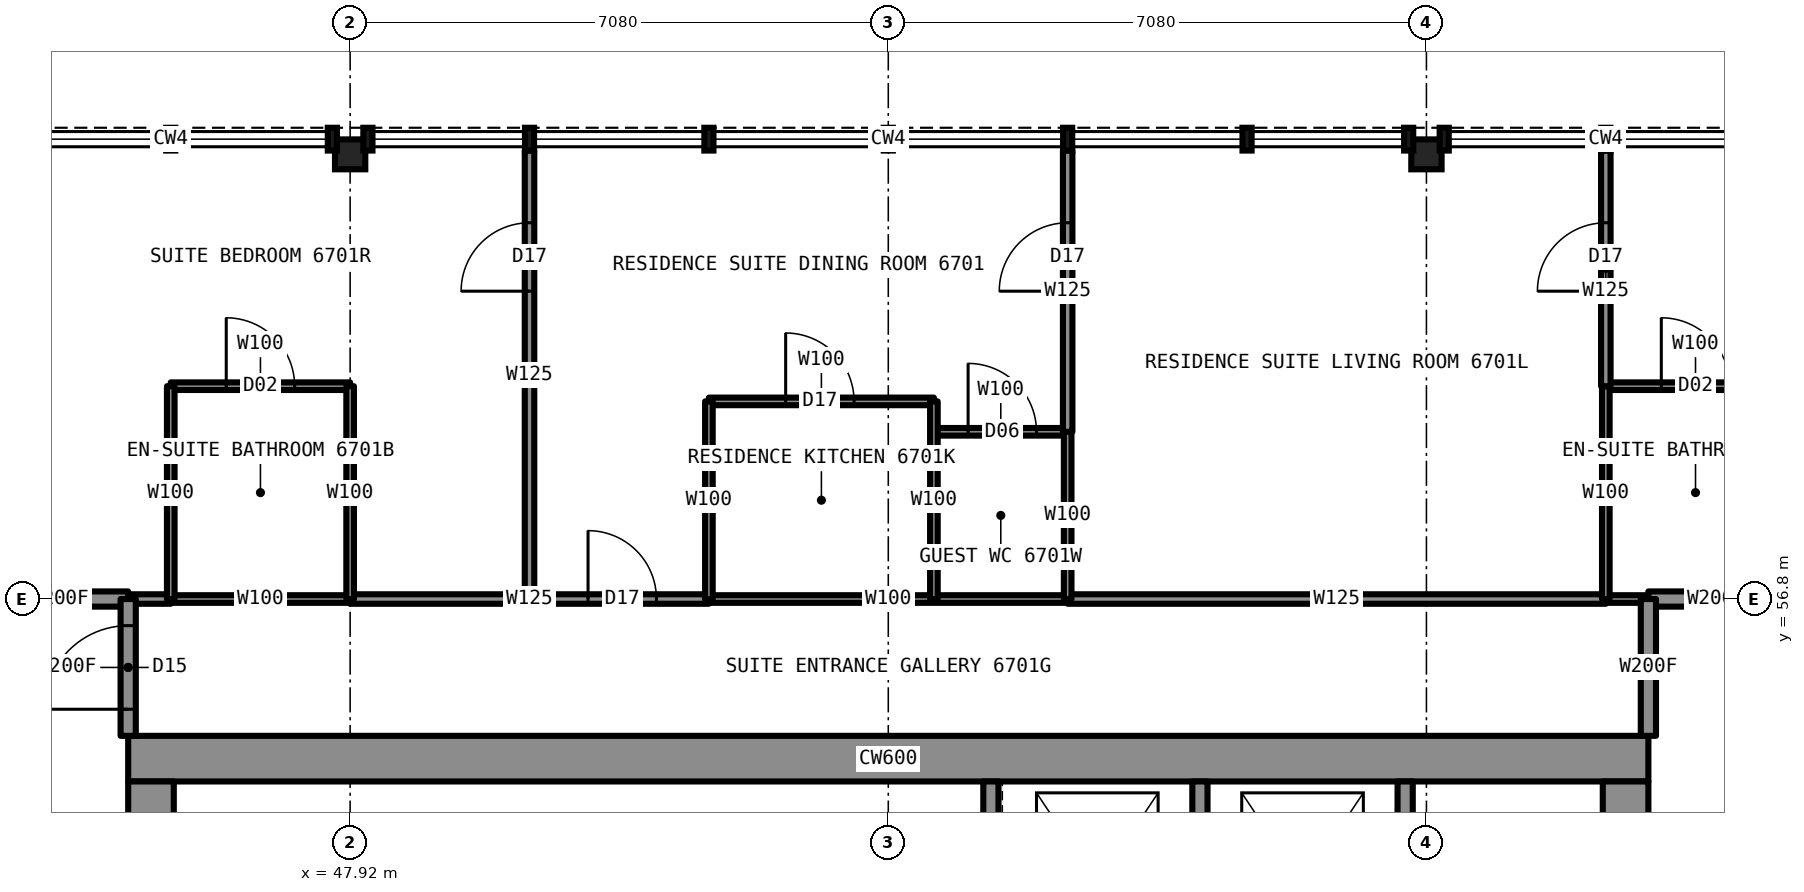
"""IFC4 building model, lengths in metres.
Left out: names, types, materials, properties, quantities, classifications, styles, units other than length and angle.
Written with IfcOpenShell. Run it as: python <this file> out.ifc"""

import sys

from ifc_helpers import new_model, si_unit, direction, frame, frame_2d, origin, origin_2d, place, context, subcontext, project, spatial, rectangle, i_section, extrude, element, fill, save


model = new_model("IFC4")
c1 = context("Model", 3, precision=1e-05, world=origin(), true_north=direction((0.0, 1.0)))
c2 = subcontext(c1, "Body", "Model", "MODEL_VIEW")
j1 = project(units=[si_unit("LENGTHUNIT", "METRE"), si_unit("PLANEANGLEUNIT", "RADIAN")], contexts=[c1])
p1 = place(None, origin())
s1 = spatial("IfcSite", under=j1, at=p1, CompositionType="ELEMENT")
p2 = place(p1, origin())
s2 = spatial("IfcBuilding", under=s1, at=p2, CompositionType="ELEMENT")
p3 = place(p2, frame((0.0, 0.0, 247.7)))
s3 = spatial("IfcBuildingStorey", under=s2, at=p3, CompositionType="ELEMENT", Elevation=247.7)
for number, where, z_axis, x_axis in (
    (1, (47.92, 62.65, 0.0), (0.0, 0.0, 1.0), (1.0, 0.0, 0.0)),
    (2, (62.08, 62.65, 0.0), (0.0, 0.0, 1.0), (1.0, 0.0, 0.0)),
):
    element("IfcColumn", number, at=place(p3, frame(where, z_axis=z_axis, x_axis=x_axis)), inside=s3, PredefinedType="COLUMN", context=c2, shape_type="SweptSolid", body=[
        extrude(i_section(OverallWidth=0.399, OverallDepth=0.394, WebThickness=0.023, FlangeThickness=0.037, at=origin_2d()), origin(), (0.0, 0.0, 1.0), 3.5),
    ])
p4 = place(p3, frame((45.0, 54.7, 0.0), z_axis=(0.0, 0.0, 1.0), x_axis=(1.0, 0.0, 0.0)))
e3 = element("IfcWall", 3, at=p4, inside=s3, PredefinedType="SHEAR", context=c2, shape_type="SweptSolid", body=[
    extrude(rectangle(XDim=20.0, YDim=0.6, at=frame_2d((10.0, 0.0))), origin(), (0.0, 0.0, 1.0), 3.5),
])
p5 = place(p3, frame((64.7, 35.6, 0.0), z_axis=(0.0, 0.0, 1.0), x_axis=(0.0, 1.0, 0.0)))
e4 = element("IfcWall", 4, at=p5, inside=s3, PredefinedType="SHEAR", context=c2, shape_type="SweptSolid", body=[
    extrude(rectangle(XDim=18.8, YDim=0.6, at=frame_2d((9.4, 0.0))), origin(), (0.0, 0.0, 1.0), 3.5),
])
p6 = place(p5, frame((13.4, 0.0, 0.0)))
e5 = element("IfcOpeningElement", 5, at=p6, cuts=e4, PredefinedType="OPENING", context=c2, shape_type="SweptSolid", body=[
    extrude(rectangle(XDim=1.8, YDim=2.2, at=frame_2d((0.9, 1.1))), frame((0.0, 0.31, 0.0), z_axis=(0.0, -1.0, 0.0), x_axis=(1.0, 0.0, 0.0)), (0.0, 0.0, 1.0), 0.62),
])
p7 = place(p5, frame((3.6, 0.0, 0.0)))
e6 = element("IfcOpeningElement", 6, at=p7, cuts=e4, PredefinedType="OPENING", context=c2, shape_type="SweptSolid", body=[
    extrude(rectangle(XDim=1.8, YDim=2.2, at=frame_2d((0.9, 1.1))), frame((0.0, 0.31, 0.0), z_axis=(0.0, -1.0, 0.0), x_axis=(1.0, 0.0, 0.0)), (0.0, 0.0, 1.0), 0.62),
])
p8 = place(p3, frame((45.3, 35.6, 0.0), z_axis=(0.0, 0.0, 1.0), x_axis=(0.0, 1.0, 0.0)))
e7 = element("IfcWall", 7, at=p8, inside=s3, PredefinedType="SHEAR", context=c2, shape_type="SweptSolid", body=[
    extrude(rectangle(XDim=18.8, YDim=0.6, at=frame_2d((9.4, 0.0))), origin(), (0.0, 0.0, 1.0), 3.5),
])
p9 = place(p8, frame((13.4, 0.0, 0.0)))
e8 = element("IfcOpeningElement", 8, at=p9, cuts=e7, PredefinedType="OPENING", context=c2, shape_type="SweptSolid", body=[
    extrude(rectangle(XDim=1.8, YDim=2.2, at=frame_2d((0.9, 1.1))), frame((0.0, 0.31, 0.0), z_axis=(0.0, -1.0, 0.0), x_axis=(1.0, 0.0, 0.0)), (0.0, 0.0, 1.0), 0.62),
])
p10 = place(p8, frame((3.6, 0.0, 0.0)))
e9 = element("IfcOpeningElement", 9, at=p10, cuts=e7, PredefinedType="OPENING", context=c2, shape_type="SweptSolid", body=[
    extrude(rectangle(XDim=1.8, YDim=2.2, at=frame_2d((0.9, 1.1))), frame((0.0, 0.31, 0.0), z_axis=(0.0, -1.0, 0.0), x_axis=(1.0, 0.0, 0.0)), (0.0, 0.0, 1.0), 0.62),
])
p11 = place(p8, frame((6.4, 0.0, 0.0)))
e10 = element("IfcOpeningElement", 10, at=p11, cuts=e7, PredefinedType="OPENING", context=c2, shape_type="SweptSolid", body=[
    extrude(rectangle(XDim=1.2, YDim=2.2, at=frame_2d((0.6, 1.1))), frame((0.0, 0.31, 0.0), z_axis=(0.0, -1.0, 0.0), x_axis=(1.0, 0.0, 0.0)), (0.0, 0.0, 1.0), 0.62),
])
p12 = place(p3, frame((45.56, 56.8, 0.0), z_axis=(0.0, 0.0, 1.0), x_axis=(1.0, 0.0, 0.0)))
e11 = element("IfcWall", 11, at=p12, inside=s3, PredefinedType="PARTITIONING", context=c2, shape_type="SweptSolid", body=[
    extrude(rectangle(XDim=2.36, YDim=0.1, at=frame_2d((1.18, 0.0))), origin(), (0.0, 0.0, 1.0), 3.33),
])
p13 = place(p3, frame((52.64, 56.8, 0.0), z_axis=(0.0, 0.0, 1.0), x_axis=(1.0, 0.0, 0.0)))
e12 = element("IfcWall", 12, at=p13, inside=s3, PredefinedType="PARTITIONING", context=c2, shape_type="SweptSolid", body=[
    extrude(rectangle(XDim=4.72, YDim=0.1, at=frame_2d((2.36, 0.0))), origin(), (0.0, 0.0, 1.0), 3.33),
])
p14 = place(p3, frame((64.44, 56.8, 0.0), z_axis=(0.0, 0.0, 1.0), x_axis=(1.0, 0.0, 0.0)))
e13 = element("IfcWall", 13, at=p14, inside=s3, PredefinedType="PARTITIONING", context=c2, shape_type="SweptSolid", body=[
    extrude(rectangle(XDim=0.56, YDim=0.1, at=frame_2d((0.28, 0.0))), origin(), (0.0, 0.0, 1.0), 3.33),
])
p15 = place(p3, frame((43.2, 56.8, 0.0), z_axis=(0.0, 0.0, 1.0), x_axis=(1.0, 0.0, 0.0)))
e14 = element("IfcWall", 14, at=p15, inside=s3, PredefinedType="PARTITIONING", context=c2, shape_type="SweptSolid", body=[
    extrude(rectangle(XDim=1.8, YDim=0.2, at=frame_2d((0.9, 0.0))), origin(), (0.0, 0.0, 1.0), 3.33),
])
p16 = place(p3, frame((65.0, 56.8, 0.0), z_axis=(0.0, 0.0, 1.0), x_axis=(1.0, 0.0, 0.0)))
e15 = element("IfcWall", 15, at=p16, inside=s3, PredefinedType="PARTITIONING", context=c2, shape_type="SweptSolid", body=[
    extrude(rectangle(XDim=1.78, YDim=0.2, at=frame_2d((0.89, 0.0))), origin(), (0.0, 0.0, 1.0), 3.33),
])
p17 = place(p3, frame((45.0, 56.8, 0.0), z_axis=(0.0, 0.0, 1.0), x_axis=(1.0, 0.0, 0.0)))
e16 = element("IfcWall", 16, at=p17, inside=s3, PredefinedType="PARTITIONING", context=c2, shape_type="SweptSolid", body=[
    extrude(rectangle(XDim=0.56, YDim=0.125, at=frame_2d((0.28, 0.0))), origin(), (0.0, 0.0, 1.0), 3.33),
])
p18 = place(p3, frame((47.92, 56.8, 0.0), z_axis=(0.0, 0.0, 1.0), x_axis=(1.0, 0.0, 0.0)))
e17 = element("IfcWall", 17, at=p18, inside=s3, PredefinedType="PARTITIONING", context=c2, shape_type="SweptSolid", body=[
    extrude(rectangle(XDim=4.72, YDim=0.125, at=frame_2d((2.36, 0.0))), origin(), (0.0, 0.0, 1.0), 3.33),
])
p19 = place(p18, frame((3.13, 0.0, 0.0)))
e18 = element("IfcOpeningElement", 18, at=p19, cuts=e17, PredefinedType="OPENING", context=c2, shape_type="SweptSolid", body=[
    extrude(rectangle(XDim=0.9, YDim=2.2, at=frame_2d((0.45, 1.1))), frame((0.0, 0.073, 0.0), z_axis=(0.0, -1.0, 0.0), x_axis=(1.0, 0.0, 0.0)), (0.0, 0.0, 1.0), 0.145),
])
p20 = place(p3, frame((57.36, 56.8, 0.0), z_axis=(0.0, 0.0, 1.0), x_axis=(1.0, 0.0, 0.0)))
e19 = element("IfcWall", 19, at=p20, inside=s3, PredefinedType="PARTITIONING", context=c2, shape_type="SweptSolid", body=[
    extrude(rectangle(XDim=7.08, YDim=0.125, at=frame_2d((3.54, 0.0))), origin(), (0.0, 0.0, 1.0), 3.33),
])
p21 = place(p3, frame((55.6, 59.0, 0.0), z_axis=(0.0, 0.0, 1.0), x_axis=(1.0, 0.0, 0.0)))
e20 = element("IfcWall", 20, at=p21, inside=s3, PredefinedType="PARTITIONING", context=c2, shape_type="SweptSolid", body=[
    extrude(rectangle(XDim=1.76, YDim=0.1, at=frame_2d((0.88, 0.0))), origin(), (0.0, 0.0, 1.0), 3.33),
])
p22 = place(p21, frame((0.45, 0.0, 0.0)))
e21 = element("IfcOpeningElement", 21, at=p22, cuts=e20, PredefinedType="OPENING", context=c2, shape_type="SweptSolid", body=[
    extrude(rectangle(XDim=0.9, YDim=2.1, at=frame_2d((0.45, 1.05))), frame((0.0, 0.06, 0.0), z_axis=(0.0, -1.0, 0.0), x_axis=(1.0, 0.0, 0.0)), (0.0, 0.0, 1.0), 0.12),
])
p23 = place(p3, frame((52.64, 59.4, 0.0), z_axis=(0.0, 0.0, 1.0), x_axis=(1.0, 0.0, 0.0)))
e22 = element("IfcWall", 22, at=p23, inside=s3, PredefinedType="PARTITIONING", context=c2, shape_type="SweptSolid", body=[
    extrude(rectangle(XDim=2.96, YDim=0.1, at=frame_2d((1.48, 0.0))), origin(), (0.0, 0.0, 1.0), 3.33),
])
p24 = place(p23, frame((1.01, 0.0, 0.0)))
e23 = element("IfcOpeningElement", 23, at=p24, cuts=e22, PredefinedType="OPENING", context=c2, shape_type="SweptSolid", body=[
    extrude(rectangle(XDim=0.9, YDim=2.2, at=frame_2d((0.45, 1.1))), frame((0.0, 0.06, 0.0), z_axis=(0.0, -1.0, 0.0), x_axis=(1.0, 0.0, 0.0)), (0.0, 0.0, 1.0), 0.12),
])
p25 = place(p3, frame((45.56, 59.6, 0.0), z_axis=(0.0, 0.0, 1.0), x_axis=(1.0, 0.0, 0.0)))
e24 = element("IfcWall", 24, at=p25, inside=s3, PredefinedType="PARTITIONING", context=c2, shape_type="SweptSolid", body=[
    extrude(rectangle(XDim=2.36, YDim=0.1, at=frame_2d((1.18, 0.0))), origin(), (0.0, 0.0, 1.0), 3.33),
])
p26 = place(p25, frame((0.73, 0.0, 0.0)))
e25 = element("IfcOpeningElement", 25, at=p26, cuts=e24, PredefinedType="OPENING", context=c2, shape_type="SweptSolid", body=[
    extrude(rectangle(XDim=0.9, YDim=2.1, at=frame_2d((0.45, 1.05))), frame((0.0, 0.06, 0.0), z_axis=(0.0, -1.0, 0.0), x_axis=(1.0, 0.0, 0.0)), (0.0, 0.0, 1.0), 0.12),
])
p27 = place(p3, frame((64.44, 59.6, 0.0), z_axis=(0.0, 0.0, 1.0), x_axis=(1.0, 0.0, 0.0)))
e26 = element("IfcWall", 26, at=p27, inside=s3, PredefinedType="PARTITIONING", context=c2, shape_type="SweptSolid", body=[
    extrude(rectangle(XDim=2.36, YDim=0.1, at=frame_2d((1.18, 0.0))), origin(), (0.0, 0.0, 1.0), 3.33),
])
p28 = place(p27, frame((0.73, 0.0, 0.0)))
e27 = element("IfcOpeningElement", 27, at=p28, cuts=e26, PredefinedType="OPENING", context=c2, shape_type="SweptSolid", body=[
    extrude(rectangle(XDim=0.9, YDim=2.1, at=frame_2d((0.45, 1.05))), frame((0.0, 0.06, 0.0), z_axis=(0.0, -1.0, 0.0), x_axis=(1.0, 0.0, 0.0)), (0.0, 0.0, 1.0), 0.12),
])
p29 = place(p3, frame((45.0, 55.0, 0.0), z_axis=(0.0, 0.0, 1.0), x_axis=(0.0, 1.0, 0.0)))
e28 = element("IfcWall", 28, at=p29, inside=s3, PredefinedType="PARTITIONING", context=c2, shape_type="SweptSolid", body=[
    extrude(rectangle(XDim=1.8, YDim=0.2, at=frame_2d((0.9, 0.0))), origin(), (0.0, 0.0, 1.0), 3.33),
])
p30 = place(p29, frame((0.35, 0.0, 0.0)))
e29 = element("IfcOpeningElement", 29, at=p30, cuts=e28, PredefinedType="OPENING", context=c2, shape_type="SweptSolid", body=[
    extrude(rectangle(XDim=1.1, YDim=2.2, at=frame_2d((0.55, 1.1))), frame((0.0, 0.11, 0.0), z_axis=(0.0, -1.0, 0.0), x_axis=(1.0, 0.0, 0.0)), (0.0, 0.0, 1.0), 0.22),
])
p31 = place(p3, frame((52.64, 56.8, 0.0), z_axis=(0.0, 0.0, 1.0), x_axis=(0.0, 1.0, 0.0)))
e30 = element("IfcWall", 30, at=p31, inside=s3, PredefinedType="PARTITIONING", context=c2, shape_type="SweptSolid", body=[
    extrude(rectangle(XDim=2.6, YDim=0.1, at=frame_2d((1.3, 0.0))), origin(), (0.0, 0.0, 1.0), 3.33),
])
p32 = place(p3, frame((50.28, 56.8, 0.0), z_axis=(0.0, 0.0, 1.0), x_axis=(0.0, 1.0, 0.0)))
e31 = element("IfcWall", 31, at=p32, inside=s3, PredefinedType="PARTITIONING", context=c2, shape_type="SweptSolid", body=[
    extrude(rectangle(XDim=5.9, YDim=0.125, at=frame_2d((2.95, 0.0))), origin(), (0.0, 0.0, 1.0), 3.33),
])
p33 = place(p32, frame((4.05, 0.0, 0.0)))
e32 = element("IfcOpeningElement", 32, at=p33, cuts=e31, PredefinedType="OPENING", context=c2, shape_type="SweptSolid", body=[
    extrude(rectangle(XDim=0.9, YDim=2.2, at=frame_2d((0.45, 1.1))), frame((0.0, 0.073, 0.0), z_axis=(0.0, -1.0, 0.0), x_axis=(1.0, 0.0, 0.0)), (0.0, 0.0, 1.0), 0.145),
])
p34 = place(p3, frame((47.92, 56.8, 0.0), z_axis=(0.0, 0.0, 1.0), x_axis=(0.0, 1.0, 0.0)))
e33 = element("IfcWall", 33, at=p34, inside=s3, PredefinedType="PARTITIONING", context=c2, shape_type="SweptSolid", body=[
    extrude(rectangle(XDim=2.8, YDim=0.1, at=frame_2d((1.4, 0.0))), origin(), (0.0, 0.0, 1.0), 2.573),
])
p35 = place(p3, frame((45.56, 56.8, 0.0), z_axis=(0.0, 0.0, 1.0), x_axis=(0.0, 1.0, 0.0)))
e34 = element("IfcWall", 34, at=p35, inside=s3, PredefinedType="PARTITIONING", context=c2, shape_type="SweptSolid", body=[
    extrude(rectangle(XDim=2.8, YDim=0.1, at=frame_2d((1.4, 0.0))), origin(), (0.0, 0.0, 1.0), 3.33),
])
p36 = place(p3, frame((55.6, 56.8, 0.0), z_axis=(0.0, 0.0, 1.0), x_axis=(0.0, 1.0, 0.0)))
e35 = element("IfcWall", 35, at=p36, inside=s3, PredefinedType="PARTITIONING", context=c2, shape_type="SweptSolid", body=[
    extrude(rectangle(XDim=2.6, YDim=0.1, at=frame_2d((1.3, 0.0))), origin(), (0.0, 0.0, 1.0), 3.33),
])
p37 = place(p3, frame((65.0, 55.0, 0.0), z_axis=(0.0, 0.0, 1.0), x_axis=(0.0, 1.0, 0.0)))
e36 = element("IfcWall", 36, at=p37, inside=s3, PredefinedType="PARTITIONING", context=c2, shape_type="SweptSolid", body=[
    extrude(rectangle(XDim=1.8, YDim=0.2, at=frame_2d((0.9, 0.0))), origin(), (0.0, 0.0, 1.0), 3.33),
])
p38 = place(p3, frame((57.36, 56.8, 0.0), z_axis=(0.0, 0.0, 1.0), x_axis=(0.0, 1.0, 0.0)))
e37 = element("IfcWall", 37, at=p38, inside=s3, PredefinedType="PARTITIONING", context=c2, shape_type="SweptSolid", body=[
    extrude(rectangle(XDim=2.2, YDim=0.1, at=frame_2d((1.1, 0.0))), origin(), (0.0, 0.0, 1.0), 3.33),
])
p39 = place(p3, frame((57.36, 59.0, 0.0), z_axis=(0.0, 0.0, 1.0), x_axis=(0.0, 1.0, 0.0)))
e38 = element("IfcWall", 38, at=p39, inside=s3, PredefinedType="PARTITIONING", context=c2, shape_type="SweptSolid", body=[
    extrude(rectangle(XDim=3.7, YDim=0.125, at=frame_2d((1.85, 0.0))), origin(), (0.0, 0.0, 1.0), 3.33),
])
p40 = place(p39, frame((1.85, 0.0, 0.0)))
e39 = element("IfcOpeningElement", 39, at=p40, cuts=e38, PredefinedType="OPENING", context=c2, shape_type="SweptSolid", body=[
    extrude(rectangle(XDim=0.9, YDim=2.2, at=frame_2d((0.45, 1.1))), frame((0.0, 0.073, 0.0), z_axis=(0.0, -1.0, 0.0), x_axis=(1.0, 0.0, 0.0)), (0.0, 0.0, 1.0), 0.145),
])
p41 = place(p3, frame((64.44, 56.8, 0.0), z_axis=(0.0, 0.0, 1.0), x_axis=(0.0, 1.0, 0.0)))
e40 = element("IfcWall", 40, at=p41, inside=s3, PredefinedType="PARTITIONING", context=c2, shape_type="SweptSolid", body=[
    extrude(rectangle(XDim=2.8, YDim=0.1, at=frame_2d((1.4, 0.0))), origin(), (0.0, 0.0, 1.0), 3.33),
])
p42 = place(p3, frame((64.44, 59.6, 0.0), z_axis=(0.0, 0.0, 1.0), x_axis=(0.0, 1.0, 0.0)))
e41 = element("IfcWall", 41, at=p42, inside=s3, PredefinedType="PARTITIONING", context=c2, shape_type="SweptSolid", body=[
    extrude(rectangle(XDim=3.1, YDim=0.125, at=frame_2d((1.55, 0.0))), origin(), (0.0, 0.0, 1.0), 3.33),
])
p43 = place(p42, frame((1.25, 0.0, 0.0)))
e42 = element("IfcOpeningElement", 42, at=p43, cuts=e41, PredefinedType="OPENING", context=c2, shape_type="SweptSolid", body=[
    extrude(rectangle(XDim=0.9, YDim=2.2, at=frame_2d((0.45, 1.1))), frame((0.0, 0.073, 0.0), z_axis=(0.0, -1.0, 0.0), x_axis=(1.0, 0.0, 0.0)), (0.0, 0.0, 1.0), 0.145),
])
for number, where, z_axis, x_axis in (
    (43, (59.1, 51.7, 0.0), (0.0, 0.0, 1.0), (0.0, 1.0, 0.0)),
    (44, (61.8, 51.7, 0.0), (0.0, 0.0, 1.0), (0.0, 1.0, 0.0)),
    (45, (56.35, 51.7, 0.0), (0.0, 0.0, 1.0), (0.0, 1.0, 0.0)),
):
    element("IfcWall", number, at=place(p3, frame(where, z_axis=z_axis, x_axis=x_axis)), inside=s3, PredefinedType="PARTITIONING", context=c2, shape_type="SweptSolid", body=[
        extrude(rectangle(XDim=2.7, YDim=0.2, at=frame_2d((1.35, 0.0))), origin(), (0.0, 0.0, 1.0), 3.33),
    ])
p44 = place(p19, origin())
e46 = element("IfcDoor", 46, at=p44, inside=s3, OperationType="SINGLE_SWING_LEFT", PredefinedType="DOOR", context=c2, shape_type="SweptSolid", body=[
    extrude(rectangle(XDim=0.9, YDim=2.2, at=frame_2d((0.45, 1.1))), frame((0.0, 0.025, 0.0), z_axis=(0.0, -1.0, 0.0), x_axis=(1.0, 0.0, 0.0)), (0.0, 0.0, 1.0), 0.05),
])
fill(e18, e46)
p45 = place(p26, origin())
e47 = element("IfcDoor", 47, at=p45, inside=s3, OperationType="SINGLE_SWING_RIGHT", PredefinedType="DOOR", context=c2, shape_type="SweptSolid", body=[
    extrude(rectangle(XDim=0.9, YDim=2.1, at=frame_2d((0.45, 1.05))), frame((0.0, 0.025, 0.0), z_axis=(0.0, -1.0, 0.0), x_axis=(1.0, 0.0, 0.0)), (0.0, 0.0, 1.0), 0.05),
])
fill(e25, e47)
p46 = place(p28, origin())
e48 = element("IfcDoor", 48, at=p46, inside=s3, OperationType="SINGLE_SWING_RIGHT", PredefinedType="DOOR", context=c2, shape_type="SweptSolid", body=[
    extrude(rectangle(XDim=0.9, YDim=2.1, at=frame_2d((0.45, 1.05))), frame((0.0, 0.025, 0.0), z_axis=(0.0, -1.0, 0.0), x_axis=(1.0, 0.0, 0.0)), (0.0, 0.0, 1.0), 0.05),
])
fill(e27, e48)
p47 = place(p30, origin())
e49 = element("IfcDoor", 49, at=p47, inside=s3, OperationType="SINGLE_SWING_LEFT", PredefinedType="DOOR", context=c2, shape_type="SweptSolid", body=[
    extrude(rectangle(XDim=1.1, YDim=2.2, at=frame_2d((0.55, 1.1))), frame((0.0, 0.025, 0.0), z_axis=(0.0, -1.0, 0.0), x_axis=(1.0, 0.0, 0.0)), (0.0, 0.0, 1.0), 0.05),
])
fill(e29, e49)
p48 = place(p24, origin())
e50 = element("IfcDoor", 50, at=p48, inside=s3, OperationType="SINGLE_SWING_LEFT", PredefinedType="DOOR", context=c2, shape_type="SweptSolid", body=[
    extrude(rectangle(XDim=0.9, YDim=2.2, at=frame_2d((0.45, 1.1))), frame((0.0, 0.025, 0.0), z_axis=(0.0, -1.0, 0.0), x_axis=(1.0, 0.0, 0.0)), (0.0, 0.0, 1.0), 0.05),
])
fill(e23, e50)
p49 = place(p40, origin())
e51 = element("IfcDoor", 51, at=p49, inside=s3, OperationType="SINGLE_SWING_LEFT", PredefinedType="DOOR", context=c2, shape_type="SweptSolid", body=[
    extrude(rectangle(XDim=0.9, YDim=2.2, at=frame_2d((0.45, 1.1))), frame((0.0, 0.025, 0.0), z_axis=(0.0, -1.0, 0.0), x_axis=(1.0, 0.0, 0.0)), (0.0, 0.0, 1.0), 0.05),
])
fill(e39, e51)
p50 = place(p33, origin())
e52 = element("IfcDoor", 52, at=p50, inside=s3, OperationType="SINGLE_SWING_LEFT", PredefinedType="DOOR", context=c2, shape_type="SweptSolid", body=[
    extrude(rectangle(XDim=0.9, YDim=2.2, at=frame_2d((0.45, 1.1))), frame((0.0, 0.025, 0.0), z_axis=(0.0, -1.0, 0.0), x_axis=(1.0, 0.0, 0.0)), (0.0, 0.0, 1.0), 0.05),
])
fill(e32, e52)
p51 = place(p43, origin())
e53 = element("IfcDoor", 53, at=p51, inside=s3, OperationType="SINGLE_SWING_LEFT", PredefinedType="DOOR", context=c2, shape_type="SweptSolid", body=[
    extrude(rectangle(XDim=0.9, YDim=2.2, at=frame_2d((0.45, 1.1))), frame((0.0, 0.025, 0.0), z_axis=(0.0, -1.0, 0.0), x_axis=(1.0, 0.0, 0.0)), (0.0, 0.0, 1.0), 0.05),
])
fill(e42, e53)
p52 = place(p22, origin())
e54 = element("IfcDoor", 54, at=p52, inside=s3, OperationType="SINGLE_SWING_LEFT", PredefinedType="DOOR", context=c2, shape_type="SweptSolid", body=[
    extrude(rectangle(XDim=0.9, YDim=2.1, at=frame_2d((0.45, 1.05))), frame((0.0, 0.025, 0.0), z_axis=(0.0, -1.0, 0.0), x_axis=(1.0, 0.0, 0.0)), (0.0, 0.0, 1.0), 0.05),
])
fill(e21, e54)
save(model, sys.argv[1])
